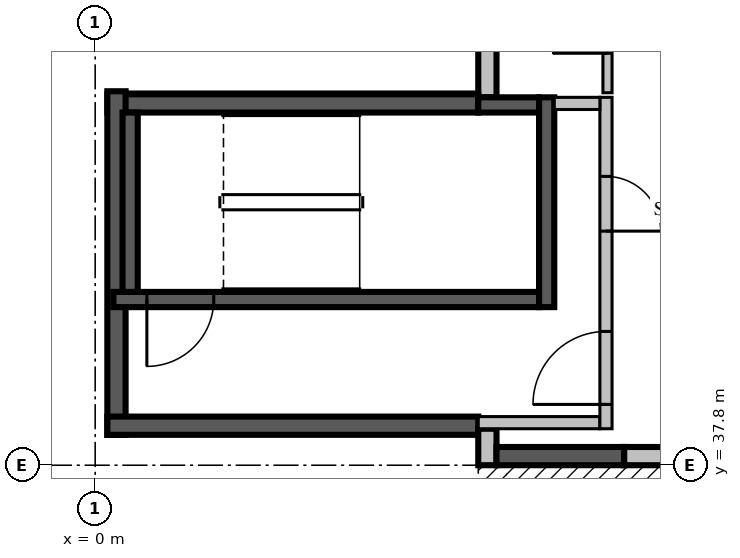
"""IFC4 building model, lengths in metres.
Left out: names, types, materials, properties, quantities, classifications, styles, units other than length and angle.
Written with IfcOpenShell. Run it as: python <this file> out.ifc"""

import sys

from ifc_helpers import new_model, si_unit, direction, frame, frame_2d, origin, place, context, subcontext, project, spatial, rectangle, extrude, source, transform, mapped, element, fill, save


model = new_model("IFC4")
c1 = context("Model", 3, precision=1e-05, world=origin(), true_north=direction((0.0, 1.0)))
c2 = subcontext(c1, "Body", "Model", "MODEL_VIEW")
j1 = project(units=[si_unit("LENGTHUNIT", "METRE"), si_unit("PLANEANGLEUNIT", "RADIAN")], contexts=[c1])
p1 = place(None, origin())
s1 = spatial("IfcSite", under=j1, at=p1, CompositionType="ELEMENT")
p2 = place(p1, origin())
s2 = spatial("IfcBuilding", under=s1, at=p2, CompositionType="ELEMENT")
p3 = place(p2, frame((0.0, 0.0, 185.4)))
s3 = spatial("IfcBuildingStorey", under=s2, at=p3, CompositionType="ELEMENT", Elevation=185.4)
m1 = source(origin(), c2, "Body", "SweptSolid", [
    extrude(rectangle(XDim=9.91, YDim=0.3, at=frame_2d((4.955, 0.0))), origin(), (0.0, 0.0, 1.0), 3.4),
])
p4 = place(p3, frame((6.45, 53.76, 0.0), z_axis=(0.0, 0.0, 1.0), x_axis=(0.0, -1.0, 0.0)))
e1 = element("IfcWall", 1, at=p4, inside=s3, PredefinedType="STANDARD", context=c2, shape_type="MappedRepresentation", body=[
    mapped(m1, transform((0.0, 0.0, 0.0), scale=1.0)),
])
m2 = source(origin(), c2, "Body", "SweptSolid", [
    extrude(rectangle(XDim=3.6, YDim=2.3, at=frame_2d((1.8, 1.15))), frame((0.0, 0.16, 0.0), z_axis=(0.0, -1.0, 0.0), x_axis=(1.0, 0.0, 0.0)), (0.0, 0.0, 1.0), 0.32),
])
p5 = place(p4, frame((3.39, 0.0, 0.6)))
e2 = element("IfcOpeningElement", 2, at=p5, cuts=e1, PredefinedType="OPENING", context=c2, shape_type="MappedRepresentation", body=[
    mapped(m2, transform((0.0, 0.0, 0.0), scale=1.0)),
])
m3 = source(origin(), c2, "Body", "SweptSolid", [
    extrude(rectangle(XDim=2.4, YDim=2.3, at=frame_2d((1.2, 1.15))), frame((0.0, 0.16, 0.0), z_axis=(0.0, -1.0, 0.0), x_axis=(1.0, 0.0, 0.0)), (0.0, 0.0, 1.0), 0.32),
])
p6 = place(p4, frame((0.495, 0.0, 0.6)))
e3 = element("IfcOpeningElement", 3, at=p6, cuts=e1, PredefinedType="OPENING", context=c2, shape_type="MappedRepresentation", body=[
    mapped(m3, transform((0.0, 0.0, 0.0), scale=1.0)),
])
m4 = source(origin(), c2, "Body", "SweptSolid", [
    extrude(rectangle(XDim=6.1, YDim=0.3, at=frame_2d((3.05, 0.0))), origin(), (0.0, 0.0, 1.0), 3.4),
])
p7 = place(p3, frame((6.3, 43.75, 0.0), z_axis=(0.0, 0.0, 1.0), x_axis=(-1.0, 0.0, 0.0)))
e4 = element("IfcWall", 4, at=p7, inside=s3, PredefinedType="SOLIDWALL", context=c2, shape_type="MappedRepresentation", body=[
    mapped(m4, transform((0.0, 0.0, 0.0), scale=1.0)),
])
m5 = source(origin(), c2, "Body", "SweptSolid", [
    extrude(rectangle(XDim=5.65, YDim=0.3, at=frame_2d((2.825, 0.0))), origin(), (0.0, 0.0, 1.0), 3.4),
])
p8 = place(p3, frame((0.35, 43.95, 0.0), z_axis=(0.0, 0.0, 1.0), x_axis=(0.0, -1.0, 0.0)))
e5 = element("IfcWall", 5, at=p8, inside=s3, PredefinedType="SOLIDWALL", context=c2, shape_type="MappedRepresentation", body=[
    mapped(m5, transform((0.0, 0.0, 0.0), scale=1.0)),
])
p9 = place(p3, frame((0.2, 38.45, 0.0), z_axis=(0.0, 0.0, 1.0), x_axis=(1.0, 0.0, 0.0)))
e6 = element("IfcWall", 6, at=p9, inside=s3, PredefinedType="SOLIDWALL", context=c2, shape_type="MappedRepresentation", body=[
    mapped(m4, transform((0.0, 0.0, 0.0), scale=1.0)),
])
m6 = source(origin(), c2, "Body", "SweptSolid", [
    extrude(rectangle(XDim=0.6, YDim=0.3, at=frame_2d((0.3, 0.0))), origin(), (0.0, 0.0, 1.0), 3.4),
])
p10 = place(p3, frame((6.45, 38.4, 0.0), z_axis=(0.0, 0.0, 1.0), x_axis=(0.0, -1.0, 0.0)))
e7 = element("IfcWall", 7, at=p10, inside=s3, PredefinedType="STANDARD", context=c2, shape_type="MappedRepresentation", body=[
    mapped(m6, transform((0.0, 0.0, 0.0), scale=1.0)),
])
p11 = place(p3, frame((6.6, 37.95, 0.0), z_axis=(0.0, 0.0, 1.0), x_axis=(1.0, 0.0, 0.0)))
e8 = element("IfcWall", 8, at=p11, inside=s3, PredefinedType="SOLIDWALL", context=c2, shape_type="SweptSolid", body=[
    extrude(rectangle(XDim=2.1, YDim=0.3, at=frame_2d((1.05, 0.0))), origin(), (0.0, 0.0, 1.0), 3.4),
])
p12 = place(p3, frame((8.7, 37.95, 0.0), z_axis=(0.0, 0.0, 1.0), x_axis=(1.0, 0.0, 0.0)))
e9 = element("IfcWall", 9, at=p12, inside=s3, PredefinedType="STANDARD", context=c2, shape_type="SweptSolid", body=[
    extrude(rectangle(XDim=1.35, YDim=0.3, at=frame_2d((0.675, 0.0))), origin(), (0.0, 0.0, 1.0), 3.4),
])
m7 = source(origin(), c2, "Body", "SweptSolid", [
    extrude(rectangle(XDim=7.0, YDim=0.25, at=frame_2d((3.5, 0.0))), origin(), (0.0, 0.0, 1.0), 3.4),
])
p13 = place(p3, frame((0.3, 40.525, 0.0), z_axis=(0.0, 0.0, 1.0), x_axis=(1.0, 0.0, 0.0)))
e10 = element("IfcWall", 10, at=p13, inside=s3, PredefinedType="SOLIDWALL", context=c2, shape_type="MappedRepresentation", body=[
    mapped(m7, transform((0.0, 0.0, 0.0), scale=1.0)),
])
m8 = source(origin(), c2, "Body", "SweptSolid", [
    extrude(rectangle(XDim=1.1, YDim=2.1, at=frame_2d((0.55, 1.05))), frame((0.0, 0.135, 0.0), z_axis=(0.0, -1.0, 0.0), x_axis=(1.0, 0.0, 0.0)), (0.0, 0.0, 1.0), 0.27),
])
p14 = place(p13, frame((0.55, 0.0, 0.0)))
e11 = element("IfcOpeningElement", 11, at=p14, cuts=e10, PredefinedType="OPENING", context=c2, shape_type="MappedRepresentation", body=[
    mapped(m8, transform((0.0, 0.0, 0.0), scale=1.0)),
])
m9 = source(origin(), c2, "Body", "SweptSolid", [
    extrude(rectangle(XDim=1.0, YDim=0.25, at=frame_2d((0.5, 0.0))), origin(), (0.0, 0.0, 1.0), 3.4),
])
p15 = place(p3, frame((6.3, 43.725, 0.0), z_axis=(0.0, 0.0, 1.0), x_axis=(1.0, 0.0, 0.0)))
e12 = element("IfcWall", 12, at=p15, inside=s3, PredefinedType="SOLIDWALL", context=c2, shape_type="MappedRepresentation", body=[
    mapped(m9, transform((0.0, 0.0, 0.0), scale=1.0)),
])
m10 = source(origin(), c2, "Body", "SweptSolid", [
    extrude(rectangle(XDim=3.45, YDim=0.25, at=frame_2d((1.725, 0.0))), origin(), (0.0, 0.0, 1.0), 3.4),
])
p16 = place(p3, frame((7.425, 40.4, 0.0), z_axis=(0.0, 0.0, 1.0), x_axis=(0.0, 1.0, 0.0)))
e13 = element("IfcWall", 13, at=p16, inside=s3, PredefinedType="SOLIDWALL", context=c2, shape_type="MappedRepresentation", body=[
    mapped(m10, transform((0.0, 0.0, 0.0), scale=1.0)),
])
m11 = source(origin(), c2, "Body", "SweptSolid", [
    extrude(rectangle(XDim=2.95, YDim=0.25, at=frame_2d((1.475, 0.0))), origin(), (0.0, 0.0, 1.0), 3.4),
])
p17 = place(p3, frame((0.575, 40.65, 0.0), z_axis=(0.0, 0.0, 1.0), x_axis=(0.0, 1.0, 0.0)))
e14 = element("IfcWall", 14, at=p17, inside=s3, PredefinedType="SOLIDWALL", context=c2, shape_type="MappedRepresentation", body=[
    mapped(m11, transform((0.0, 0.0, 0.0), scale=1.0)),
])
m12 = source(origin(), c2, "Body", "SweptSolid", [
    extrude(rectangle(XDim=2.0, YDim=0.2, at=frame_2d((1.0, 0.0))), origin(), (0.0, 0.0, 1.0), 3.4),
])
p18 = place(p3, frame((6.3, 38.5, 0.0), z_axis=(0.0, 0.0, 1.0), x_axis=(1.0, 0.0, 0.0)))
e15 = element("IfcWall", 15, at=p18, inside=s3, PredefinedType="PARTITIONING", context=c2, shape_type="MappedRepresentation", body=[
    mapped(m12, transform((0.0, 0.0, 0.0), scale=1.0)),
])
m13 = source(origin(), c2, "Body", "SweptSolid", [
    extrude(rectangle(XDim=5.45, YDim=0.2, at=frame_2d((2.725, 0.0))), origin(), (0.0, 0.0, 1.0), 3.4),
])
p19 = place(p3, frame((8.4, 38.4, 0.0), z_axis=(0.0, 0.0, 1.0), x_axis=(0.0, 1.0, 0.0)))
e16 = element("IfcWall", 16, at=p19, inside=s3, PredefinedType="PARTITIONING", context=c2, shape_type="MappedRepresentation", body=[
    mapped(m13, transform((0.0, 0.0, 0.0), scale=1.0)),
])
m14 = source(origin(), c2, "Body", "SweptSolid", [
    extrude(rectangle(XDim=1.2, YDim=2.1, at=frame_2d((0.6, 1.05))), frame((0.0, 0.11, 0.0), z_axis=(0.0, -1.0, 0.0), x_axis=(1.0, 0.0, 0.0)), (0.0, 0.0, 1.0), 0.22),
])
p20 = place(p19, frame((0.4, 0.0, 0.0)))
e17 = element("IfcOpeningElement", 17, at=p20, cuts=e16, PredefinedType="OPENING", context=c2, shape_type="MappedRepresentation", body=[
    mapped(m14, transform((0.0, 0.0, 0.0), scale=1.0)),
])
m15 = source(origin(), c2, "Body", "SweptSolid", [
    extrude(rectangle(XDim=0.9, YDim=2.1, at=frame_2d((0.45, 1.05))), frame((0.0, 0.11, 0.0), z_axis=(0.0, -1.0, 0.0), x_axis=(1.0, 0.0, 0.0)), (0.0, 0.0, 1.0), 0.22),
])
p21 = place(p19, frame((3.25, 0.0, 0.0)))
e18 = element("IfcOpeningElement", 18, at=p21, cuts=e16, PredefinedType="OPENING", context=c2, shape_type="MappedRepresentation", body=[
    mapped(m15, transform((0.0, 0.0, 0.0), scale=1.0)),
])
m16 = source(origin(), c2, "Body", "SweptSolid", [
    extrude(rectangle(XDim=0.75, YDim=0.2, at=frame_2d((0.375, 0.0))), origin(), (0.0, 0.0, 1.0), 3.4),
])
p22 = place(p3, frame((7.55, 43.75, 0.0), z_axis=(0.0, 0.0, 1.0), x_axis=(1.0, 0.0, 0.0)))
e19 = element("IfcWall", 19, at=p22, inside=s3, PredefinedType="PARTITIONING", context=c2, shape_type="MappedRepresentation", body=[
    mapped(m16, transform((0.0, 0.0, 0.0), scale=1.0)),
])
m17 = source(origin(), c2, "Body", "SweptSolid", [
    extrude(rectangle(XDim=2.2, YDim=0.15, at=frame_2d((1.1, 0.0))), origin(), (0.0, 0.0, 1.0), 3.4),
])
p23 = place(p3, frame((8.425, 43.925, 0.0), z_axis=(0.0, 0.0, 1.0), x_axis=(0.0, 1.0, 0.0)))
e20 = element("IfcWall", 20, at=p23, inside=s3, PredefinedType="PARTITIONING", context=c2, shape_type="MappedRepresentation", body=[
    mapped(m17, transform((0.0, 0.0, 0.0), scale=1.0)),
])
m18 = source(origin(), c2, "Body", "SweptSolid", [
    extrude(rectangle(XDim=0.9, YDim=2.1, at=frame_2d((0.45, 1.05))), frame((0.0, 0.085, 0.0), z_axis=(0.0, -1.0, 0.0), x_axis=(1.0, 0.0, 0.0)), (0.0, 0.0, 1.0), 0.17),
])
p24 = place(p23, frame((0.65, 0.0, 0.0)))
e21 = element("IfcOpeningElement", 21, at=p24, cuts=e20, PredefinedType="OPENING", context=c2, shape_type="MappedRepresentation", body=[
    mapped(m18, transform((0.0, 0.0, 0.0), scale=1.0)),
])
m19 = source(origin(), c2, "Body", "SweptSolid", [
    extrude(rectangle(XDim=1.1, YDim=2.1, at=frame_2d((0.55, 1.05))), frame((0.0, 0.025, 0.0), z_axis=(0.0, -1.0, 0.0), x_axis=(1.0, 0.0, 0.0)), (0.0, 0.0, 1.0), 0.05),
])
p25 = place(p14, origin())
e22 = element("IfcDoor", 22, at=p25, inside=s3, OperationType="SINGLE_SWING_RIGHT", PredefinedType="DOOR", context=c2, shape_type="MappedRepresentation", body=[
    mapped(m19, transform((0.0, 0.0, 0.0), scale=1.0)),
])
fill(e11, e22)
m20 = source(origin(), c2, "Body", "SweptSolid", [
    extrude(rectangle(XDim=1.2, YDim=2.1, at=frame_2d((0.6, 1.05))), frame((0.0, 0.025, 0.0), z_axis=(0.0, -1.0, 0.0), x_axis=(1.0, 0.0, 0.0)), (0.0, 0.0, 1.0), 0.05),
])
p26 = place(p20, origin())
e23 = element("IfcDoor", 23, at=p26, inside=s3, OperationType="SINGLE_SWING_LEFT", PredefinedType="DOOR", context=c2, shape_type="MappedRepresentation", body=[
    mapped(m20, transform((0.0, 0.0, 0.0), scale=1.0)),
])
fill(e17, e23)
m21 = source(origin(), c2, "Body", "SweptSolid", [
    extrude(rectangle(XDim=0.9, YDim=2.1, at=frame_2d((0.45, 1.05))), frame((0.0, 0.025, 0.0), z_axis=(0.0, -1.0, 0.0), x_axis=(1.0, 0.0, 0.0)), (0.0, 0.0, 1.0), 0.05),
])
p27 = place(p21, origin())
e24 = element("IfcDoor", 24, at=p27, inside=s3, OperationType="SINGLE_SWING_RIGHT", PredefinedType="DOOR", context=c2, shape_type="MappedRepresentation", body=[
    mapped(m21, transform((0.0, 0.0, 0.0), scale=1.0)),
])
fill(e18, e24)
p28 = place(p24, origin())
e25 = element("IfcDoor", 25, at=p28, inside=s3, OperationType="SINGLE_SWING_LEFT", PredefinedType="DOOR", context=c2, shape_type="MappedRepresentation", body=[
    mapped(m21, transform((0.0, 0.0, 0.0), scale=1.0)),
])
fill(e21, e25)
save(model, sys.argv[1])
